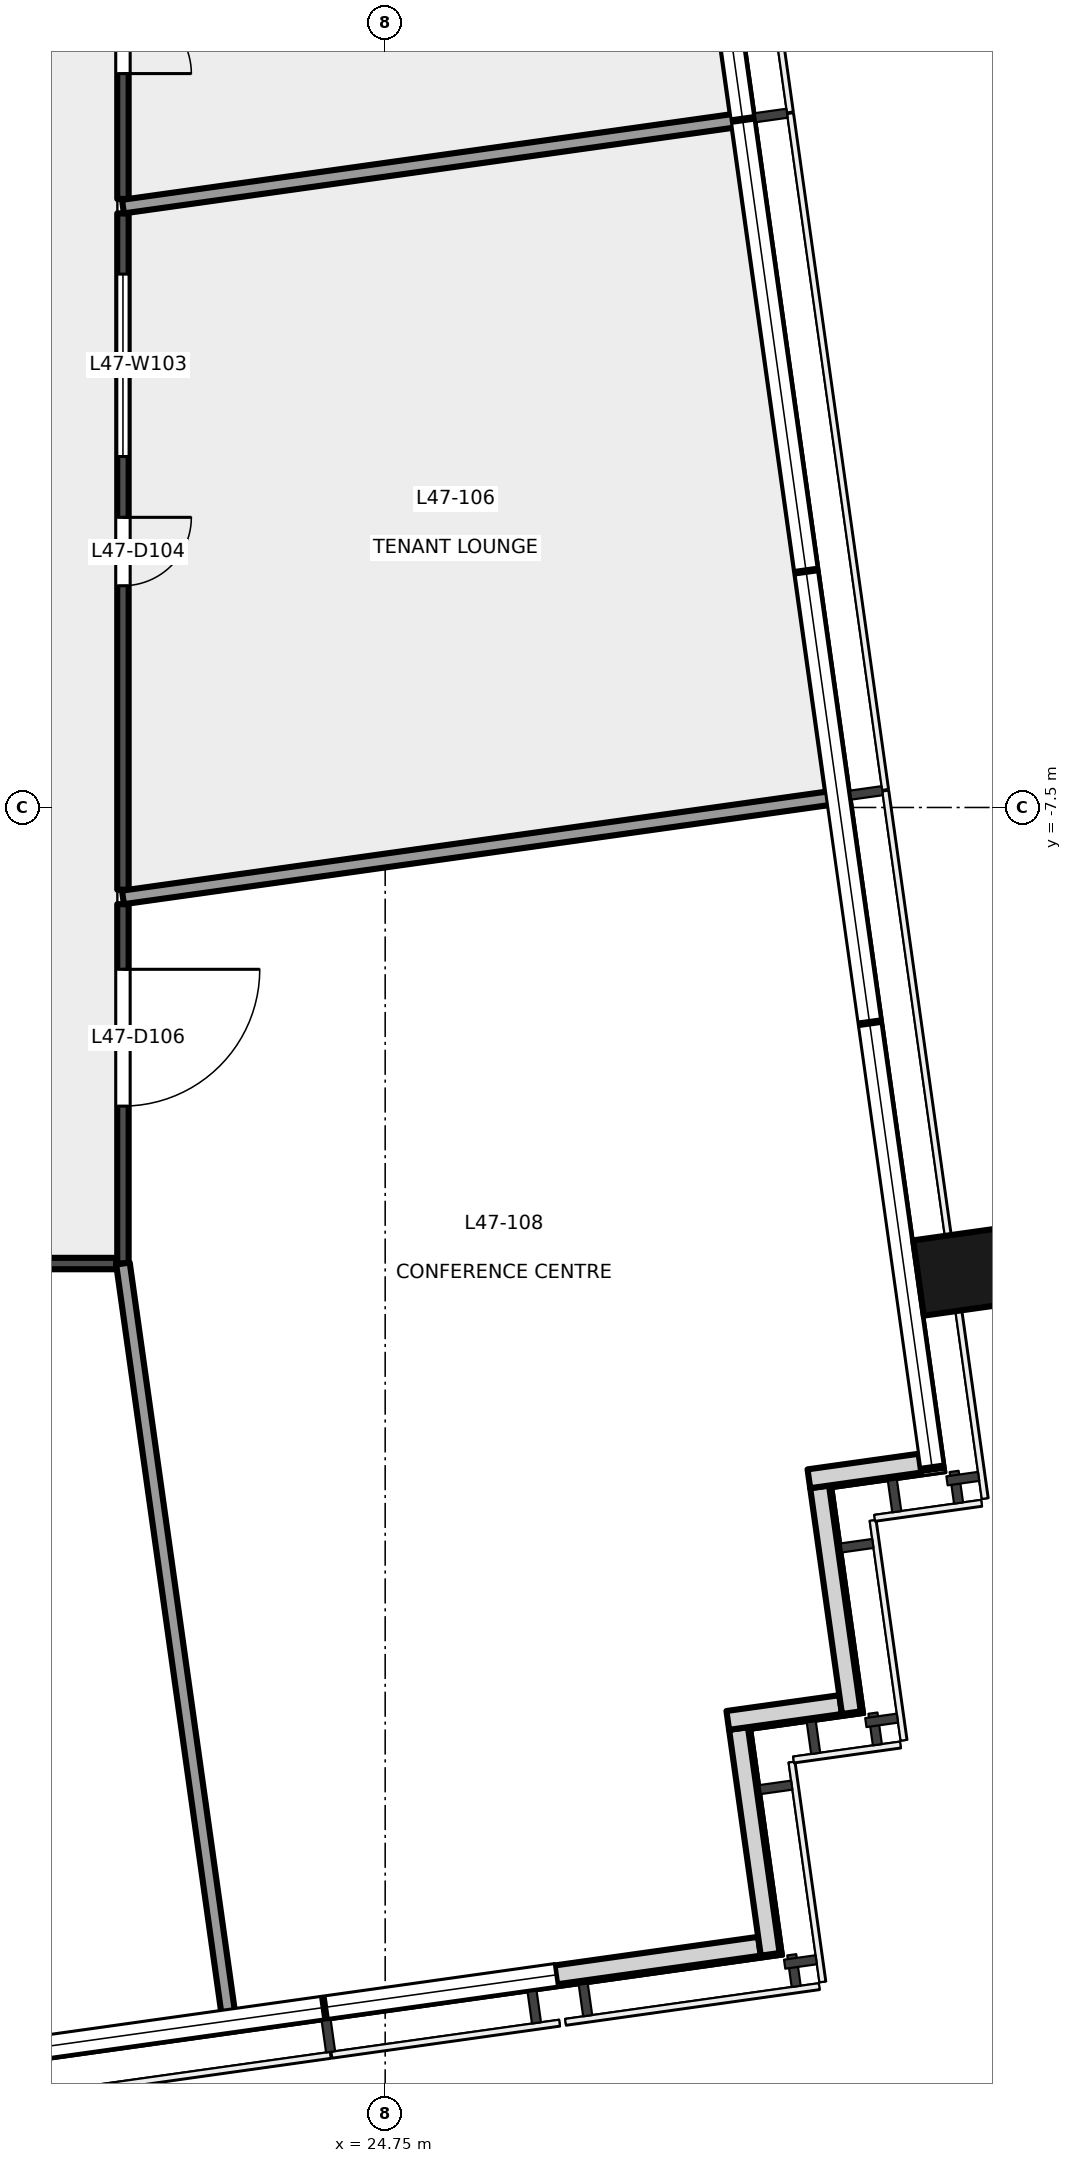
"""IFC4 building model, lengths in metres.
Left out: names, types, materials, properties, quantities, classifications, styles, units other than length and angle.
Written with IfcOpenShell. Run it as: python <this file> out.ifc"""

import sys

from ifc_helpers import new_model, si_unit, direction, frame, frame_2d, origin, origin_2d, place, context, subcontext, project, spatial, rectangle, extrude, element, fill, save


model = new_model("IFC4")
c1 = context("Model", 3, precision=1e-05, world=origin(), true_north=direction((0.0, 1.0)))
c2 = subcontext(c1, "Body", "Model", "MODEL_VIEW")
j1 = project(units=[si_unit("LENGTHUNIT", "METRE"), si_unit("PLANEANGLEUNIT", "RADIAN")], contexts=[c1])
p1 = place(None, origin())
s1 = spatial("IfcSite", under=j1, at=p1, CompositionType="ELEMENT")
p2 = place(p1, origin())
s2 = spatial("IfcBuilding", under=s1, at=p2, CompositionType="ELEMENT")
p3 = place(p2, frame((0.0, 0.0, 208.1)))
s3 = spatial("IfcBuildingStorey", under=s2, at=p3, CompositionType="ELEMENT", Elevation=208.1)
p4 = place(p3, frame((32.658, -13.565, -0.2), z_axis=(0.0, 0.0, 1.0), x_axis=(-0.139190384377, 0.990265639562, 0.0)))
e1 = element("IfcColumn", 1, at=p4, inside=s3, PredefinedType="COLUMN", context=c2, shape_type="SweptSolid", body=[
    extrude(rectangle(XDim=1.0, YDim=1.8, at=origin_2d()), origin(), (0.0, 0.0, 1.0), 5.4),
])
p5 = place(p3, frame((26.995, -22.859, 0.0), z_axis=(0.0, 0.0, 1.0), x_axis=(0.99024510326, 0.139336411139, 0.0)))
e2 = element("IfcWall", 2, at=p5, inside=s3, PredefinedType="SOLIDWALL", context=c2, shape_type="SweptSolid", body=[
    extrude(rectangle(XDim=2.705, YDim=0.25, at=frame_2d((1.353, 0.0))), origin(), (0.0, 0.0, 1.0), 5.2),
])
p6 = place(p3, frame((29.815, -22.588, 0.0), z_axis=(0.0, 0.0, 1.0), x_axis=(-0.138983028379, 0.9902947631, 0.0)))
e3 = element("IfcWall", 3, at=p6, inside=s3, PredefinedType="SOLIDWALL", context=c2, shape_type="SweptSolid", body=[
    extrude(rectangle(XDim=3.0, YDim=0.25, at=frame_2d((1.5, 0.0))), origin(), (0.0, 0.0, 1.0), 5.2),
])
p7 = place(p3, frame((29.257, -19.51, 0.0), z_axis=(0.0, 0.0, 1.0), x_axis=(0.990330117064, 0.138730887823, 0.0)))
e4 = element("IfcWall", 4, at=p7, inside=s3, PredefinedType="SOLIDWALL", context=c2, shape_type="SweptSolid", body=[
    extrude(rectangle(XDim=1.499, YDim=0.25, at=frame_2d((0.75, 0.0))), origin(), (0.0, 0.0, 1.0), 5.2),
])
p8 = place(p3, frame((30.883, -19.409, 0.0), z_axis=(0.0, 0.0, 1.0), x_axis=(-0.139324658755, 0.990246756855, 0.0)))
e5 = element("IfcWall", 5, at=p8, inside=s3, PredefinedType="SOLIDWALL", context=c2, shape_type="SweptSolid", body=[
    extrude(rectangle(XDim=3.0, YDim=0.25, at=frame_2d((1.5, 0.0))), origin(), (0.0, 0.0, 1.0), 5.2),
])
p9 = place(p3, frame((30.324, -16.332, 0.0), z_axis=(0.0, 0.0, 1.0), x_axis=(0.99024837765, 0.13931313851, 0.0)))
e6 = element("IfcWall", 6, at=p9, inside=s3, PredefinedType="SOLIDWALL", context=c2, shape_type="SweptSolid", body=[
    extrude(rectangle(XDim=1.476, YDim=0.25, at=frame_2d((0.738, 0.0))), origin(), (0.0, 0.0, 1.0), 5.2),
])
p10 = place(p3, frame((21.211, -13.5, 0.0), z_axis=(0.0, 0.0, 1.0), x_axis=(-1.0, 0.0, 0.0)))
e7 = element("IfcWall", 7, at=p10, inside=s3, PredefinedType="PARTITIONING", context=c2, shape_type="SweptSolid", body=[
    extrude(rectangle(XDim=20.287, YDim=0.15, at=frame_2d((10.144, 0.0))), origin(), (0.0, 0.0, 1.0), 4.3),
])
p11 = place(p10, frame((9.243, 0.0, 0.0)))
e8 = element("IfcOpeningElement", 8, at=p11, cuts=e7, PredefinedType="OPENING", context=c2, shape_type="SweptSolid", body=[
    extrude(rectangle(XDim=1.8, YDim=2.1, at=frame_2d((0.9, 1.05))), frame((0.0, 0.085, 0.0), z_axis=(0.0, -1.0, 0.0), x_axis=(1.0, 0.0, 0.0)), (0.0, 0.0, 1.0), 0.171),
])
p12 = place(p10, frame((3.422, 0.0, 0.0)))
e9 = element("IfcOpeningElement", 9, at=p12, cuts=e7, PredefinedType="OPENING", context=c2, shape_type="SweptSolid", body=[
    extrude(rectangle(XDim=2.4, YDim=2.4, at=frame_2d((1.2, 1.2))), frame((0.0, 0.085, 0.0), z_axis=(0.0, -1.0, 0.0), x_axis=(1.0, 0.0, 0.0)), (0.0, 0.0, 1.0), 0.171),
])
p13 = place(p3, frame((21.3, 0.316, 0.0), z_axis=(0.0, 0.0, 1.0), x_axis=(0.0, -1.0, 0.0)))
e10 = element("IfcWall", 10, at=p13, inside=s3, PredefinedType="PARTITIONING", context=c2, shape_type="SweptSolid", body=[
    extrude(rectangle(XDim=8.898, YDim=0.15, at=frame_2d((4.449, 0.0))), origin(), (0.0, 0.0, 1.0), 4.6),
])
p14 = place(p13, frame((3.999, 0.0, 0.0)))
e11 = element("IfcOpeningElement", 11, at=p14, cuts=e10, PredefinedType="OPENING", context=c2, shape_type="SweptSolid", body=[
    extrude(rectangle(XDim=0.9, YDim=2.1, at=frame_2d((0.45, 1.05))), frame((0.0, 0.085, 0.0), z_axis=(0.0, -1.0, 0.0), x_axis=(1.0, 0.0, 0.0)), (0.0, 0.0, 1.0), 0.171),
])
p15 = place(p13, frame((0.799, 0.0, 0.0)))
e12 = element("IfcOpeningElement", 12, at=p15, cuts=e10, PredefinedType="OPENING", context=c2, shape_type="SweptSolid", body=[
    extrude(rectangle(XDim=2.4, YDim=2.4, at=frame_2d((1.2, 1.2))), frame((0.0, 0.085, 0.0), z_axis=(0.0, -1.0, 0.0), x_axis=(1.0, 0.0, 0.0)), (0.0, 0.0, 1.0), 0.171),
])
p16 = place(p3, frame((21.3, 7.5, 0.0), z_axis=(0.0, 0.0, 1.0), x_axis=(0.0, -1.0, 0.0)))
e13 = element("IfcWall", 13, at=p16, inside=s3, PredefinedType="PARTITIONING", context=c2, shape_type="SweptSolid", body=[
    extrude(rectangle(XDim=6.994, YDim=0.15, at=frame_2d((3.497, 0.0))), origin(), (0.0, 0.0, 1.0), 4.65),
])
p17 = place(p16, frame((4.445, 0.0, 0.0)))
e14 = element("IfcOpeningElement", 14, at=p17, cuts=e13, PredefinedType="OPENING", context=c2, shape_type="SweptSolid", body=[
    extrude(rectangle(XDim=0.9, YDim=2.1, at=frame_2d((0.45, 1.05))), frame((0.0, 0.085, 0.0), z_axis=(0.0, -1.0, 0.0), x_axis=(1.0, 0.0, 0.0)), (0.0, 0.0, 1.0), 0.171),
])
p18 = place(p16, frame((1.06, 0.0, 0.0)))
e15 = element("IfcOpeningElement", 15, at=p18, cuts=e13, PredefinedType="OPENING", context=c2, shape_type="SweptSolid", body=[
    extrude(rectangle(XDim=2.4, YDim=2.4, at=frame_2d((1.2, 1.2))), frame((0.0, 0.085, 0.0), z_axis=(0.0, -1.0, 0.0), x_axis=(1.0, 0.0, 0.0)), (0.0, 0.0, 1.0), 0.171),
])
p19 = place(p3, frame((21.3, -8.772, 0.0), z_axis=(0.0, 0.0, 1.0), x_axis=(0.0, -1.0, 0.0)))
e16 = element("IfcWall", 16, at=p19, inside=s3, PredefinedType="PARTITIONING", context=c2, shape_type="SweptSolid", body=[
    extrude(rectangle(XDim=4.728, YDim=0.15, at=frame_2d((2.364, 0.0))), origin(), (0.0, 0.0, 1.0), 5.2),
])
p20 = place(p19, frame((0.857, 0.0, 0.0)))
e17 = element("IfcOpeningElement", 17, at=p20, cuts=e16, PredefinedType="OPENING", context=c2, shape_type="SweptSolid", body=[
    extrude(rectangle(XDim=1.8, YDim=2.1, at=frame_2d((0.9, 1.05))), frame((0.0, 0.085, 0.0), z_axis=(0.0, -1.0, 0.0), x_axis=(1.0, 0.0, 0.0)), (0.0, 0.0, 1.0), 0.171),
])
p21 = place(p3, frame((21.3, -13.5, 0.0), z_axis=(0.0, 0.0, 1.0), x_axis=(0.139100263023, -0.990278302714, 0.0)))
e18 = element("IfcWall", 18, at=p21, inside=s3, PredefinedType="PARTITIONING", context=c2, shape_type="SweptSolid", body=[
    extrude(rectangle(XDim=9.971, YDim=0.18, at=frame_2d((4.985, 0.0))), origin(), (0.0, 0.0, 1.0), 5.2),
])
p22 = place(p3, frame((21.3, 0.405, 0.0), z_axis=(0.0, 0.0, 1.0), x_axis=(0.990272463684, 0.139141825733, 0.0)))
e19 = element("IfcWall", 19, at=p22, inside=s3, PredefinedType="PARTITIONING", context=c2, shape_type="SweptSolid", body=[
    extrude(rectangle(XDim=8.143, YDim=0.18, at=frame_2d((4.072, 0.0))), origin(), (0.0, 0.0, 1.0), 5.2),
])
p23 = place(p3, frame((30.617, -7.374, 0.0), z_axis=(0.0, 0.0, 1.0), x_axis=(-0.990272786483, -0.139139528356, 0.0)))
e20 = element("IfcWall", 20, at=p23, inside=s3, PredefinedType="PARTITIONING", context=c2, shape_type="SweptSolid", body=[
    extrude(rectangle(XDim=9.408, YDim=0.18, at=frame_2d((4.704, 0.0))), origin(), (0.0, 0.0, 1.0), 5.2),
])
p24 = place(p14, origin())
e21 = element("IfcDoor", 21, at=p24, inside=s3, OperationType="SINGLE_SWING_LEFT", PredefinedType="DOOR", context=c2, shape_type="SweptSolid", body=[
    extrude(rectangle(XDim=0.9, YDim=2.1, at=frame_2d((0.45, 1.05))), frame((0.0, 0.025, 0.0), z_axis=(0.0, -1.0, 0.0), x_axis=(1.0, 0.0, 0.0)), (0.0, 0.0, 1.0), 0.05),
])
fill(e11, e21)
p25 = place(p17, origin())
e22 = element("IfcDoor", 22, at=p25, inside=s3, OperationType="SINGLE_SWING_RIGHT", PredefinedType="DOOR", context=c2, shape_type="SweptSolid", body=[
    extrude(rectangle(XDim=0.9, YDim=2.1, at=frame_2d((0.45, 1.05))), frame((0.0, 0.025, 0.0), z_axis=(0.0, -1.0, 0.0), x_axis=(1.0, 0.0, 0.0)), (0.0, 0.0, 1.0), 0.05),
])
fill(e14, e22)
p26 = place(p20, origin())
e23 = element("IfcDoor", 23, at=p26, inside=s3, OperationType="DOUBLE_DOOR_SINGLE_SWING", PredefinedType="DOOR", context=c2, shape_type="SweptSolid", body=[
    extrude(rectangle(XDim=1.8, YDim=2.1, at=frame_2d((0.9, 1.05))), frame((0.0, 0.025, 0.0), z_axis=(0.0, -1.0, 0.0), x_axis=(1.0, 0.0, 0.0)), (0.0, 0.0, 1.0), 0.05),
])
fill(e17, e23)
p27 = place(p15, origin())
e24 = element("IfcWindow", 24, at=p27, inside=s3, PartitioningType="SINGLE_PANEL", PredefinedType="WINDOW", context=c2, shape_type="SweptSolid", body=[
    extrude(rectangle(XDim=2.4, YDim=2.4, at=frame_2d((1.2, 1.2))), frame((0.0, 0.03, 0.0), z_axis=(0.0, -1.0, 0.0), x_axis=(1.0, 0.0, 0.0)), (0.0, 0.0, 1.0), 0.06),
])
fill(e12, e24)
save(model, sys.argv[1])
